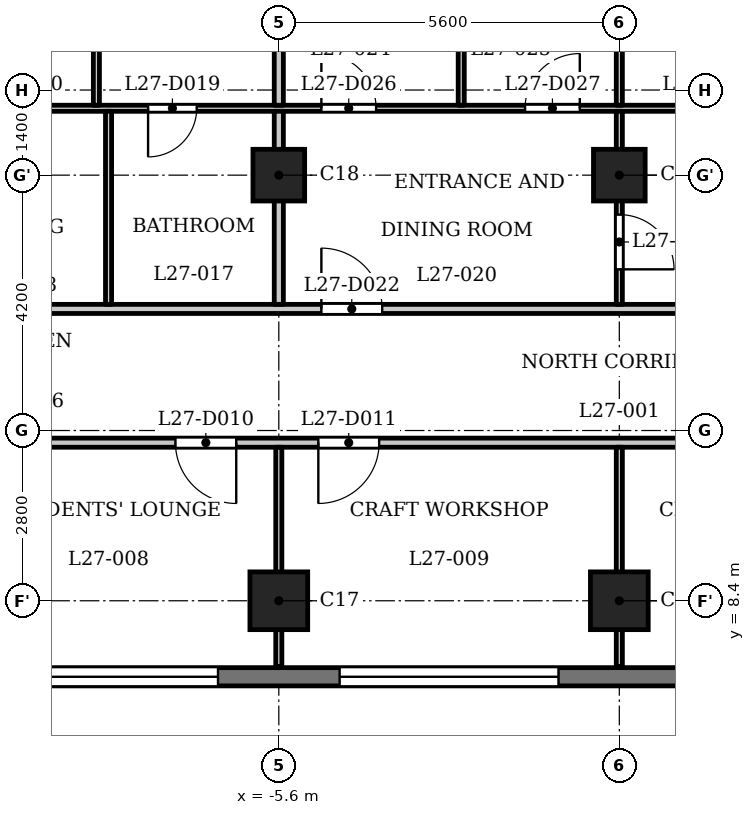
"""IFC4 building model, lengths in metres.
Left out: names, types, materials, properties, quantities, classifications, styles, units other than length and angle.
Written with IfcOpenShell. Run it as: python <this file> out.ifc"""

import sys

from ifc_helpers import new_model, si_unit, direction, frame, frame_2d, origin, origin_2d, place, context, subcontext, project, spatial, rectangle, extrude, element, fill, save


model = new_model("IFC4")
c1 = context("Model", 3, precision=1e-05, world=origin(), true_north=direction((0.0, 1.0)))
c2 = subcontext(c1, "Body", "Model", "MODEL_VIEW")
j1 = project(units=[si_unit("LENGTHUNIT", "METRE"), si_unit("PLANEANGLEUNIT", "RADIAN")], contexts=[c1])
p1 = place(None, origin())
s1 = spatial("IfcSite", under=j1, at=p1, CompositionType="ELEMENT")
p2 = place(p1, origin())
s2 = spatial("IfcBuilding", under=s1, at=p2, CompositionType="ELEMENT")
p3 = place(p2, frame((0.0, 0.0, 107.8)))
s3 = spatial("IfcBuildingStorey", under=s2, at=p3, CompositionType="ELEMENT", Elevation=107.8)
for number, where, z_axis, x_axis in (
    (1, (-5.6, 8.4, 0.0), (0.0, 0.0, 1.0), (1.0, 0.0, 0.0)),
    (2, (0.0, 8.4, 0.0), (0.0, 0.0, 1.0), (1.0, 0.0, 0.0)),
):
    element("IfcColumn", number, at=place(p3, frame(where, z_axis=z_axis, x_axis=x_axis)), inside=s3, PredefinedType="COLUMN", context=c2, shape_type="SweptSolid", body=[
        extrude(rectangle(XDim=0.95, YDim=0.95, at=origin_2d()), origin(), (0.0, 0.0, 1.0), 3.5),
    ])
for number, where, z_axis, x_axis in (
    (3, (-5.6, 15.4, 0.0), (0.0, 0.0, 1.0), (1.0, 0.0, 0.0)),
    (4, (0.0, 15.4, 0.0), (0.0, 0.0, 1.0), (1.0, 0.0, 0.0)),
):
    element("IfcColumn", number, at=place(p3, frame(where, z_axis=z_axis, x_axis=x_axis)), inside=s3, PredefinedType="COLUMN", context=c2, shape_type="SweptSolid", body=[
        extrude(rectangle(XDim=0.85, YDim=0.85, at=origin_2d()), origin(), (0.0, 0.0, 1.0), 3.5),
    ])
p4 = place(p3, frame((-13.8, 7.15, 0.0), z_axis=(0.0, 0.0, 1.0), x_axis=(1.0, 0.0, 0.0)))
e5 = element("IfcWall", 5, at=p4, inside=s3, PredefinedType="SOLIDWALL", context=c2, shape_type="SweptSolid", body=[
    extrude(rectangle(XDim=27.6, YDim=0.3, at=frame_2d((13.8, 0.0))), origin(), (0.0, 0.0, 1.0), 3.2),
])
p5 = place(p4, frame((0.363, 0.0, 0.9)))
e6 = element("IfcOpeningElement", 6, at=p5, cuts=e5, PredefinedType="OPENING", context=c2, shape_type="SweptSolid", body=[
    extrude(rectangle(XDim=1.8, YDim=1.25, at=frame_2d((0.9, 0.625))), frame((0.0, 0.16, 0.0), z_axis=(0.0, -1.0, 0.0), x_axis=(1.0, 0.0, 0.0)), (0.0, 0.0, 1.0), 0.32),
])
p6 = place(p4, frame((3.6, 0.0, 1.2)))
e7 = element("IfcOpeningElement", 7, at=p6, cuts=e5, PredefinedType="OPENING", context=c2, shape_type="SweptSolid", body=[
    extrude(rectangle(XDim=3.6, YDim=0.95, at=frame_2d((1.8, 0.475))), frame((0.0, 0.16, 0.0), z_axis=(0.0, -1.0, 0.0), x_axis=(1.0, 0.0, 0.0)), (0.0, 0.0, 1.0), 0.32),
])
p7 = place(p4, frame((9.2, 0.0, 1.2)))
e8 = element("IfcOpeningElement", 8, at=p7, cuts=e5, PredefinedType="OPENING", context=c2, shape_type="SweptSolid", body=[
    extrude(rectangle(XDim=3.6, YDim=0.95, at=frame_2d((1.8, 0.475))), frame((0.0, 0.16, 0.0), z_axis=(0.0, -1.0, 0.0), x_axis=(1.0, 0.0, 0.0)), (0.0, 0.0, 1.0), 0.32),
])
p8 = place(p4, frame((14.8, 0.0, 1.2)))
e9 = element("IfcOpeningElement", 9, at=p8, cuts=e5, PredefinedType="OPENING", context=c2, shape_type="SweptSolid", body=[
    extrude(rectangle(XDim=3.6, YDim=0.95, at=frame_2d((1.8, 0.475))), frame((0.0, 0.16, 0.0), z_axis=(0.0, -1.0, 0.0), x_axis=(1.0, 0.0, 0.0)), (0.0, 0.0, 1.0), 0.32),
])
p9 = place(p4, frame((20.4, 0.0, 1.2)))
e10 = element("IfcOpeningElement", 10, at=p9, cuts=e5, PredefinedType="OPENING", context=c2, shape_type="SweptSolid", body=[
    extrude(rectangle(XDim=3.6, YDim=0.95, at=frame_2d((1.8, 0.475))), frame((0.0, 0.16, 0.0), z_axis=(0.0, -1.0, 0.0), x_axis=(1.0, 0.0, 0.0)), (0.0, 0.0, 1.0), 0.32),
])
p10 = place(p4, frame((25.438, 0.0, 0.9)))
e11 = element("IfcOpeningElement", 11, at=p10, cuts=e5, PredefinedType="OPENING", context=c2, shape_type="SweptSolid", body=[
    extrude(rectangle(XDim=1.8, YDim=1.25, at=frame_2d((0.9, 0.625))), frame((0.0, 0.16, 0.0), z_axis=(0.0, -1.0, 0.0), x_axis=(1.0, 0.0, 0.0)), (0.0, 0.0, 1.0), 0.32),
])
p11 = place(p3, frame((-14.925, 11.0, 0.0), z_axis=(0.0, 0.0, 1.0), x_axis=(1.0, 0.0, 0.0)))
e12 = element("IfcWall", 12, at=p11, inside=s3, PredefinedType="PARTITIONING", context=c2, shape_type="SweptSolid", body=[
    extrude(rectangle(XDim=29.85, YDim=0.15, at=frame_2d((14.925, 0.0))), origin(), (0.0, 0.0, 1.0), 3.2),
])
p12 = place(p11, frame((1.076, 0.0, 0.0)))
e13 = element("IfcOpeningElement", 13, at=p12, cuts=e12, PredefinedType="OPENING", context=c2, shape_type="SweptSolid", body=[
    extrude(rectangle(XDim=1.0, YDim=2.1, at=frame_2d((0.5, 1.05))), frame((0.0, 0.085, 0.0), z_axis=(0.0, -1.0, 0.0), x_axis=(1.0, 0.0, 0.0)), (0.0, 0.0, 1.0), 0.17),
])
p13 = place(p11, frame((7.625, 0.0, 0.0)))
e14 = element("IfcOpeningElement", 14, at=p13, cuts=e12, PredefinedType="OPENING", context=c2, shape_type="SweptSolid", body=[
    extrude(rectangle(XDim=1.0, YDim=2.1, at=frame_2d((0.5, 1.05))), frame((0.0, 0.085, 0.0), z_axis=(0.0, -1.0, 0.0), x_axis=(1.0, 0.0, 0.0)), (0.0, 0.0, 1.0), 0.17),
])
p14 = place(p11, frame((9.975, 0.0, 0.0)))
e15 = element("IfcOpeningElement", 15, at=p14, cuts=e12, PredefinedType="OPENING", context=c2, shape_type="SweptSolid", body=[
    extrude(rectangle(XDim=1.0, YDim=2.1, at=frame_2d((0.5, 1.05))), frame((0.0, 0.085, 0.0), z_axis=(0.0, -1.0, 0.0), x_axis=(1.0, 0.0, 0.0)), (0.0, 0.0, 1.0), 0.17),
])
p15 = place(p11, frame((18.825, 0.0, 0.0)))
e16 = element("IfcOpeningElement", 16, at=p15, cuts=e12, PredefinedType="OPENING", context=c2, shape_type="SweptSolid", body=[
    extrude(rectangle(XDim=1.0, YDim=2.1, at=frame_2d((0.5, 1.05))), frame((0.0, 0.085, 0.0), z_axis=(0.0, -1.0, 0.0), x_axis=(1.0, 0.0, 0.0)), (0.0, 0.0, 1.0), 0.17),
])
p16 = place(p11, frame((21.175, 0.0, 0.0)))
e17 = element("IfcOpeningElement", 17, at=p16, cuts=e12, PredefinedType="OPENING", context=c2, shape_type="SweptSolid", body=[
    extrude(rectangle(XDim=1.0, YDim=2.1, at=frame_2d((0.5, 1.05))), frame((0.0, 0.085, 0.0), z_axis=(0.0, -1.0, 0.0), x_axis=(1.0, 0.0, 0.0)), (0.0, 0.0, 1.0), 0.17),
])
p17 = place(p11, frame((27.775, 0.0, 0.0)))
e18 = element("IfcOpeningElement", 18, at=p17, cuts=e12, PredefinedType="OPENING", context=c2, shape_type="SweptSolid", body=[
    extrude(rectangle(XDim=1.0, YDim=2.1, at=frame_2d((0.5, 1.05))), frame((0.0, 0.085, 0.0), z_axis=(0.0, -1.0, 0.0), x_axis=(1.0, 0.0, 0.0)), (0.0, 0.0, 1.0), 0.17),
])
p18 = place(p3, frame((-17.4, 13.2, 0.0), z_axis=(0.0, 0.0, 1.0), x_axis=(1.0, 0.0, 0.0)))
e19 = element("IfcWall", 19, at=p18, inside=s3, PredefinedType="PARTITIONING", context=c2, shape_type="SweptSolid", body=[
    extrude(rectangle(XDim=34.8, YDim=0.15, at=frame_2d((17.4, 0.0))), origin(), (0.0, 0.0, 1.0), 3.2),
])
p19 = place(p18, frame((0.25, 0.0, 0.0)))
e20 = element("IfcOpeningElement", 20, at=p19, cuts=e19, PredefinedType="OPENING", context=c2, shape_type="SweptSolid", body=[
    extrude(rectangle(XDim=1.0, YDim=2.1, at=frame_2d((0.5, 1.05))), frame((0.0, 0.085, 0.0), z_axis=(0.0, -1.0, 0.0), x_axis=(1.0, 0.0, 0.0)), (0.0, 0.0, 1.0), 0.17),
])
p20 = place(p18, frame((33.65, 0.0, 0.0)))
e21 = element("IfcOpeningElement", 21, at=p20, cuts=e19, PredefinedType="OPENING", context=c2, shape_type="SweptSolid", body=[
    extrude(rectangle(XDim=1.0, YDim=2.1, at=frame_2d((0.5, 1.05))), frame((0.0, 0.085, 0.0), z_axis=(0.0, -1.0, 0.0), x_axis=(1.0, 0.0, 0.0)), (0.0, 0.0, 1.0), 0.17),
])
p21 = place(p18, frame((4.55, 0.0, 0.0)))
e22 = element("IfcOpeningElement", 22, at=p21, cuts=e19, PredefinedType="OPENING", context=c2, shape_type="SweptSolid", body=[
    extrude(rectangle(XDim=1.0, YDim=2.1, at=frame_2d((0.5, 1.05))), frame((0.0, 0.085, 0.0), z_axis=(0.0, -1.0, 0.0), x_axis=(1.0, 0.0, 0.0)), (0.0, 0.0, 1.0), 0.17),
])
p22 = place(p18, frame((6.85, 0.0, 0.0)))
e23 = element("IfcOpeningElement", 23, at=p22, cuts=e19, PredefinedType="OPENING", context=c2, shape_type="SweptSolid", body=[
    extrude(rectangle(XDim=1.0, YDim=2.1, at=frame_2d((0.5, 1.05))), frame((0.0, 0.085, 0.0), z_axis=(0.0, -1.0, 0.0), x_axis=(1.0, 0.0, 0.0)), (0.0, 0.0, 1.0), 0.17),
])
p23 = place(p18, frame((12.5, 0.0, 0.0)))
e24 = element("IfcOpeningElement", 24, at=p23, cuts=e19, PredefinedType="OPENING", context=c2, shape_type="SweptSolid", body=[
    extrude(rectangle(XDim=1.0, YDim=2.1, at=frame_2d((0.5, 1.05))), frame((0.0, 0.085, 0.0), z_axis=(0.0, -1.0, 0.0), x_axis=(1.0, 0.0, 0.0)), (0.0, 0.0, 1.0), 0.17),
])
p24 = place(p18, frame((25.7, 0.0, 0.0)))
e25 = element("IfcOpeningElement", 25, at=p24, cuts=e19, PredefinedType="OPENING", context=c2, shape_type="SweptSolid", body=[
    extrude(rectangle(XDim=1.0, YDim=2.1, at=frame_2d((0.5, 1.05))), frame((0.0, 0.085, 0.0), z_axis=(0.0, -1.0, 0.0), x_axis=(1.0, 0.0, 0.0)), (0.0, 0.0, 1.0), 0.17),
])
p25 = place(p18, frame((29.75, 0.0, 0.0)))
e26 = element("IfcOpeningElement", 26, at=p25, cuts=e19, PredefinedType="OPENING", context=c2, shape_type="SweptSolid", body=[
    extrude(rectangle(XDim=1.0, YDim=2.1, at=frame_2d((0.5, 1.05))), frame((0.0, 0.085, 0.0), z_axis=(0.0, -1.0, 0.0), x_axis=(1.0, 0.0, 0.0)), (0.0, 0.0, 1.0), 0.17),
])
p26 = place(p3, frame((-16.725, 16.5, 0.0), z_axis=(0.0, 0.0, 1.0), x_axis=(1.0, 0.0, 0.0)))
e27 = element("IfcWall", 27, at=p26, inside=s3, PredefinedType="PARTITIONING", context=c2, shape_type="SweptSolid", body=[
    extrude(rectangle(XDim=33.45, YDim=0.1, at=frame_2d((16.725, 0.0))), origin(), (0.0, 0.0, 1.0), 3.2),
])
p27 = place(p26, frame((1.075, 0.0, 0.0)))
e28 = element("IfcOpeningElement", 28, at=p27, cuts=e27, PredefinedType="OPENING", context=c2, shape_type="SweptSolid", body=[
    extrude(rectangle(XDim=0.8, YDim=2.1, at=frame_2d((0.4, 1.05))), frame((0.0, 0.06, 0.0), z_axis=(0.0, -1.0, 0.0), x_axis=(1.0, 0.0, 0.0)), (0.0, 0.0, 1.0), 0.12),
])
p28 = place(p26, frame((3.975, 0.0, 0.0)))
e29 = element("IfcOpeningElement", 29, at=p28, cuts=e27, PredefinedType="OPENING", context=c2, shape_type="SweptSolid", body=[
    extrude(rectangle(XDim=0.9, YDim=2.1, at=frame_2d((0.45, 1.05))), frame((0.0, 0.06, 0.0), z_axis=(0.0, -1.0, 0.0), x_axis=(1.0, 0.0, 0.0)), (0.0, 0.0, 1.0), 0.12),
])
p29 = place(p26, frame((8.975, 0.0, 0.0)))
e30 = element("IfcOpeningElement", 30, at=p29, cuts=e27, PredefinedType="OPENING", context=c2, shape_type="SweptSolid", body=[
    extrude(rectangle(XDim=0.8, YDim=2.1, at=frame_2d((0.4, 1.05))), frame((0.0, 0.06, 0.0), z_axis=(0.0, -1.0, 0.0), x_axis=(1.0, 0.0, 0.0)), (0.0, 0.0, 1.0), 0.12),
])
p30 = place(p26, frame((6.325, 0.0, 0.0)))
e31 = element("IfcOpeningElement", 31, at=p30, cuts=e27, PredefinedType="OPENING", context=c2, shape_type="SweptSolid", body=[
    extrude(rectangle(XDim=0.9, YDim=2.1, at=frame_2d((0.45, 1.05))), frame((0.0, 0.06, 0.0), z_axis=(0.0, -1.0, 0.0), x_axis=(1.0, 0.0, 0.0)), (0.0, 0.0, 1.0), 0.12),
])
p31 = place(p26, frame((20.725, 0.0, 0.0)))
e32 = element("IfcOpeningElement", 32, at=p31, cuts=e27, PredefinedType="OPENING", context=c2, shape_type="SweptSolid", body=[
    extrude(rectangle(XDim=0.8, YDim=2.1, at=frame_2d((0.4, 1.05))), frame((0.0, 0.06, 0.0), z_axis=(0.0, -1.0, 0.0), x_axis=(1.0, 0.0, 0.0)), (0.0, 0.0, 1.0), 0.12),
])
p32 = place(p26, frame((17.775, 0.0, 0.0)))
e33 = element("IfcOpeningElement", 33, at=p32, cuts=e27, PredefinedType="OPENING", context=c2, shape_type="SweptSolid", body=[
    extrude(rectangle(XDim=0.9, YDim=2.1, at=frame_2d((0.45, 1.05))), frame((0.0, 0.06, 0.0), z_axis=(0.0, -1.0, 0.0), x_axis=(1.0, 0.0, 0.0)), (0.0, 0.0, 1.0), 0.12),
])
p33 = place(p26, frame((11.825, 0.0, 0.0)))
e34 = element("IfcOpeningElement", 34, at=p33, cuts=e27, PredefinedType="OPENING", context=c2, shape_type="SweptSolid", body=[
    extrude(rectangle(XDim=0.9, YDim=2.1, at=frame_2d((0.45, 1.05))), frame((0.0, 0.06, 0.0), z_axis=(0.0, -1.0, 0.0), x_axis=(1.0, 0.0, 0.0)), (0.0, 0.0, 1.0), 0.12),
])
p34 = place(p26, frame((15.175, 0.0, 0.0)))
e35 = element("IfcOpeningElement", 35, at=p34, cuts=e27, PredefinedType="OPENING", context=c2, shape_type="SweptSolid", body=[
    extrude(rectangle(XDim=0.9, YDim=2.1, at=frame_2d((0.45, 1.05))), frame((0.0, 0.06, 0.0), z_axis=(0.0, -1.0, 0.0), x_axis=(1.0, 0.0, 0.0)), (0.0, 0.0, 1.0), 0.12),
])
p35 = place(p26, frame((22.975, 0.0, 0.0)))
e36 = element("IfcOpeningElement", 36, at=p35, cuts=e27, PredefinedType="OPENING", context=c2, shape_type="SweptSolid", body=[
    extrude(rectangle(XDim=0.8, YDim=2.1, at=frame_2d((0.4, 1.05))), frame((0.0, 0.06, 0.0), z_axis=(0.0, -1.0, 0.0), x_axis=(1.0, 0.0, 0.0)), (0.0, 0.0, 1.0), 0.12),
])
p36 = place(p26, frame((24.875, 0.0, 0.0)))
e37 = element("IfcOpeningElement", 37, at=p36, cuts=e27, PredefinedType="OPENING", context=c2, shape_type="SweptSolid", body=[
    extrude(rectangle(XDim=0.9, YDim=2.1, at=frame_2d((0.45, 1.05))), frame((0.0, 0.06, 0.0), z_axis=(0.0, -1.0, 0.0), x_axis=(1.0, 0.0, 0.0)), (0.0, 0.0, 1.0), 0.12),
])
p37 = place(p26, frame((32.075, 0.0, 0.0)))
e38 = element("IfcOpeningElement", 38, at=p37, cuts=e27, PredefinedType="OPENING", context=c2, shape_type="SweptSolid", body=[
    extrude(rectangle(XDim=0.8, YDim=2.1, at=frame_2d((0.4, 1.05))), frame((0.0, 0.06, 0.0), z_axis=(0.0, -1.0, 0.0), x_axis=(1.0, 0.0, 0.0)), (0.0, 0.0, 1.0), 0.12),
])
p38 = place(p26, frame((29.175, 0.0, 0.0)))
e39 = element("IfcOpeningElement", 39, at=p38, cuts=e27, PredefinedType="OPENING", context=c2, shape_type="SweptSolid", body=[
    extrude(rectangle(XDim=0.9, YDim=2.1, at=frame_2d((0.45, 1.05))), frame((0.0, 0.06, 0.0), z_axis=(0.0, -1.0, 0.0), x_axis=(1.0, 0.0, 0.0)), (0.0, 0.0, 1.0), 0.12),
])
p39 = place(p3, frame((-8.6, 16.55, 0.0), z_axis=(0.0, 0.0, 1.0), x_axis=(0.0, 1.0, 0.0)))
e40 = element("IfcWall", 40, at=p39, inside=s3, PredefinedType="PARTITIONING", context=c2, shape_type="SweptSolid", body=[
    extrude(rectangle(XDim=5.53, YDim=0.1, at=frame_2d((2.765, 0.0))), origin(), (0.0, 0.0, 1.0), 3.2),
])
p40 = place(p39, frame((1.35, 0.0, 0.0)))
e41 = element("IfcOpeningElement", 41, at=p40, cuts=e40, PredefinedType="OPENING", context=c2, shape_type="SweptSolid", body=[
    extrude(rectangle(XDim=0.9, YDim=2.1, at=frame_2d((0.45, 1.05))), frame((0.0, 0.06, 0.0), z_axis=(0.0, -1.0, 0.0), x_axis=(1.0, 0.0, 0.0)), (0.0, 0.0, 1.0), 0.12),
])
p41 = place(p3, frame((-8.4, 13.275, 0.0), z_axis=(0.0, 0.0, 1.0), x_axis=(0.0, 1.0, 0.0)))
e42 = element("IfcWall", 42, at=p41, inside=s3, PredefinedType="PARTITIONING", context=c2, shape_type="SweptSolid", body=[
    extrude(rectangle(XDim=3.175, YDim=0.1, at=frame_2d((1.587, 0.0))), origin(), (0.0, 0.0, 1.0), 3.2),
])
p42 = place(p3, frame((-5.6, 7.32, 0.0), z_axis=(0.0, 0.0, 1.0), x_axis=(0.0, 1.0, 0.0)))
e43 = element("IfcWall", 43, at=p42, inside=s3, PredefinedType="PARTITIONING", context=c2, shape_type="SweptSolid", body=[
    extrude(rectangle(XDim=3.605, YDim=0.1, at=frame_2d((1.802, 0.0))), origin(), (0.0, 0.0, 1.0), 3.2),
])
p43 = place(p3, frame((-5.6, 13.275, 0.0), z_axis=(0.0, 0.0, 1.0), x_axis=(0.0, 1.0, 0.0)))
e44 = element("IfcWall", 44, at=p43, inside=s3, PredefinedType="PARTITIONING", context=c2, shape_type="SweptSolid", body=[
    extrude(rectangle(XDim=3.175, YDim=0.15, at=frame_2d((1.587, 0.0))), origin(), (0.0, 0.0, 1.0), 3.2),
])
p44 = place(p3, frame((-5.6, 16.55, 0.0), z_axis=(0.0, 0.0, 1.0), x_axis=(0.0, 1.0, 0.0)))
e45 = element("IfcWall", 45, at=p44, inside=s3, PredefinedType="PARTITIONING", context=c2, shape_type="SweptSolid", body=[
    extrude(rectangle(XDim=6.43, YDim=0.15, at=frame_2d((3.215, 0.0))), origin(), (0.0, 0.0, 1.0), 3.2),
])
p45 = place(p3, frame((-2.6, 16.55, 0.0), z_axis=(0.0, 0.0, 1.0), x_axis=(0.0, 1.0, 0.0)))
e46 = element("IfcWall", 46, at=p45, inside=s3, PredefinedType="PARTITIONING", context=c2, shape_type="SweptSolid", body=[
    extrude(rectangle(XDim=5.53, YDim=0.1, at=frame_2d((2.765, 0.0))), origin(), (0.0, 0.0, 1.0), 3.2),
])
p46 = place(p3, frame((0.0, 7.32, 0.0), z_axis=(0.0, 0.0, 1.0), x_axis=(0.0, 1.0, 0.0)))
e47 = element("IfcWall", 47, at=p46, inside=s3, PredefinedType="PARTITIONING", context=c2, shape_type="SweptSolid", body=[
    extrude(rectangle(XDim=3.605, YDim=0.1, at=frame_2d((1.802, 0.0))), origin(), (0.0, 0.0, 1.0), 3.2),
])
p47 = place(p3, frame((0.0, 13.275, 0.0), z_axis=(0.0, 0.0, 1.0), x_axis=(0.0, 1.0, 0.0)))
e48 = element("IfcWall", 48, at=p47, inside=s3, PredefinedType="PARTITIONING", context=c2, shape_type="SweptSolid", body=[
    extrude(rectangle(XDim=3.175, YDim=0.1, at=frame_2d((1.587, 0.0))), origin(), (0.0, 0.0, 1.0), 3.2),
])
p48 = place(p47, frame((0.576, 0.0, 0.0)))
e49 = element("IfcOpeningElement", 49, at=p48, cuts=e48, PredefinedType="OPENING", context=c2, shape_type="SweptSolid", body=[
    extrude(rectangle(XDim=0.9, YDim=2.1, at=frame_2d((0.45, 1.05))), frame((0.0, 0.06, 0.0), z_axis=(0.0, -1.0, 0.0), x_axis=(1.0, 0.0, 0.0)), (0.0, 0.0, 1.0), 0.12),
])
p49 = place(p3, frame((0.0, 16.55, 0.0), z_axis=(0.0, 0.0, 1.0), x_axis=(0.0, 1.0, 0.0)))
e50 = element("IfcWall", 50, at=p49, inside=s3, PredefinedType="PARTITIONING", context=c2, shape_type="SweptSolid", body=[
    extrude(rectangle(XDim=6.43, YDim=0.1, at=frame_2d((3.215, 0.0))), origin(), (0.0, 0.0, 1.0), 3.2),
])
p50 = place(p13, origin())
e51 = element("IfcDoor", 51, at=p50, inside=s3, OperationType="SINGLE_SWING_RIGHT", PredefinedType="DOOR", context=c2, shape_type="SweptSolid", body=[
    extrude(rectangle(XDim=1.0, YDim=2.1, at=frame_2d((0.5, 1.05))), frame((0.0, 0.025, 0.0), z_axis=(0.0, -1.0, 0.0), x_axis=(1.0, 0.0, 0.0)), (0.0, 0.0, 1.0), 0.05),
])
fill(e14, e51)
p51 = place(p14, origin())
e52 = element("IfcDoor", 52, at=p51, inside=s3, OperationType="SINGLE_SWING_LEFT", PredefinedType="DOOR", context=c2, shape_type="SweptSolid", body=[
    extrude(rectangle(XDim=1.0, YDim=2.1, at=frame_2d((0.5, 1.05))), frame((0.0, 0.025, 0.0), z_axis=(0.0, -1.0, 0.0), x_axis=(1.0, 0.0, 0.0)), (0.0, 0.0, 1.0), 0.05),
])
fill(e15, e52)
p52 = place(p29, origin())
e53 = element("IfcDoor", 53, at=p52, inside=s3, OperationType="SINGLE_SWING_LEFT", PredefinedType="DOOR", context=c2, shape_type="SweptSolid", body=[
    extrude(rectangle(XDim=0.8, YDim=2.1, at=frame_2d((0.4, 1.05))), frame((0.0, 0.025, 0.0), z_axis=(0.0, -1.0, 0.0), x_axis=(1.0, 0.0, 0.0)), (0.0, 0.0, 1.0), 0.05),
])
fill(e30, e53)
p53 = place(p23, origin())
e54 = element("IfcDoor", 54, at=p53, inside=s3, OperationType="SINGLE_SWING_RIGHT", PredefinedType="DOOR", context=c2, shape_type="SweptSolid", body=[
    extrude(rectangle(XDim=1.0, YDim=2.1, at=frame_2d((0.5, 1.05))), frame((0.0, 0.025, 0.0), z_axis=(0.0, -1.0, 0.0), x_axis=(1.0, 0.0, 0.0)), (0.0, 0.0, 1.0), 0.05),
])
fill(e24, e54)
p54 = place(p48, origin())
e55 = element("IfcDoor", 55, at=p54, inside=s3, OperationType="SINGLE_SWING_LEFT", PredefinedType="DOOR", context=c2, shape_type="SweptSolid", body=[
    extrude(rectangle(XDim=0.9, YDim=2.1, at=frame_2d((0.45, 1.05))), frame((0.0, 0.025, 0.0), z_axis=(0.0, -1.0, 0.0), x_axis=(1.0, 0.0, 0.0)), (0.0, 0.0, 1.0), 0.05),
])
fill(e49, e55)
p55 = place(p33, origin())
e56 = element("IfcDoor", 56, at=p55, inside=s3, OperationType="SINGLE_SWING_RIGHT", PredefinedType="DOOR", context=c2, shape_type="SweptSolid", body=[
    extrude(rectangle(XDim=0.9, YDim=2.1, at=frame_2d((0.45, 1.05))), frame((0.0, 0.025, 0.0), z_axis=(0.0, -1.0, 0.0), x_axis=(1.0, 0.0, 0.0)), (0.0, 0.0, 1.0), 0.05),
])
fill(e34, e56)
p56 = place(p34, origin())
e57 = element("IfcDoor", 57, at=p56, inside=s3, OperationType="SINGLE_SWING_LEFT", PredefinedType="DOOR", context=c2, shape_type="SweptSolid", body=[
    extrude(rectangle(XDim=0.9, YDim=2.1, at=frame_2d((0.45, 1.05))), frame((0.0, 0.025, 0.0), z_axis=(0.0, -1.0, 0.0), x_axis=(1.0, 0.0, 0.0)), (0.0, 0.0, 1.0), 0.05),
])
fill(e35, e57)
p57 = place(p6, origin())
e58 = element("IfcWindow", 58, at=p57, inside=s3, PartitioningType="SINGLE_PANEL", PredefinedType="WINDOW", context=c2, shape_type="SweptSolid", body=[
    extrude(rectangle(XDim=3.6, YDim=0.95, at=frame_2d((1.8, 0.475))), frame((0.0, 0.03, 0.0), z_axis=(0.0, -1.0, 0.0), x_axis=(1.0, 0.0, 0.0)), (0.0, 0.0, 1.0), 0.06),
])
fill(e7, e58)
p58 = place(p7, origin())
e59 = element("IfcWindow", 59, at=p58, inside=s3, PartitioningType="SINGLE_PANEL", PredefinedType="WINDOW", context=c2, shape_type="SweptSolid", body=[
    extrude(rectangle(XDim=3.6, YDim=0.95, at=frame_2d((1.8, 0.475))), frame((0.0, 0.03, 0.0), z_axis=(0.0, -1.0, 0.0), x_axis=(1.0, 0.0, 0.0)), (0.0, 0.0, 1.0), 0.06),
])
fill(e8, e59)
save(model, sys.argv[1])
